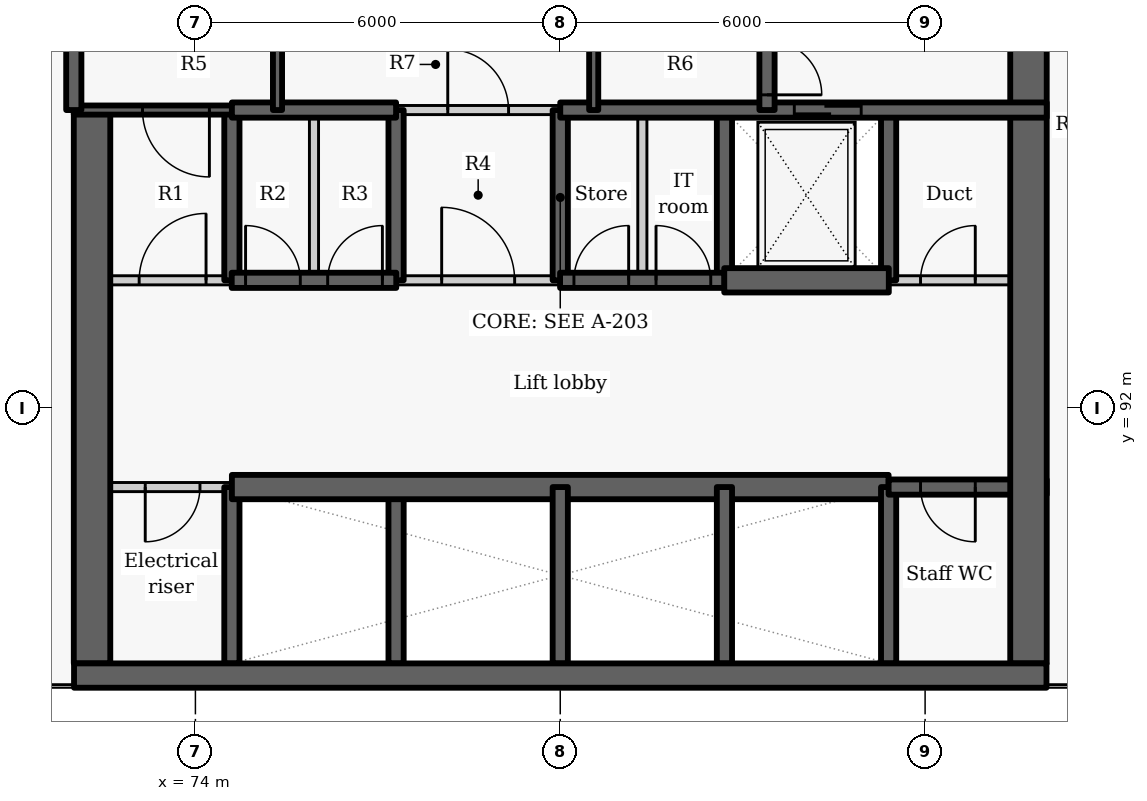
"""IFC4 building model, lengths in metres.
Left out: names, types, materials, properties, quantities, classifications, styles, units other than length and angle.
Written with IfcOpenShell. Run it as: python <this file> out.ifc"""

import sys

from ifc_helpers import new_model, si_unit, direction, frame, frame_2d, origin, place, context, subcontext, project, spatial, rectangle, extrude, element, fill, save


model = new_model("IFC4")
c1 = context("Model", 3, precision=1e-05, world=origin(), true_north=direction((0.0, 1.0)))
c2 = subcontext(c1, "Body", "Model", "MODEL_VIEW")
j1 = project(units=[si_unit("LENGTHUNIT", "METRE"), si_unit("PLANEANGLEUNIT", "RADIAN")], contexts=[c1])
p1 = place(None, origin())
s1 = spatial("IfcSite", under=j1, at=p1, CompositionType="ELEMENT")
p2 = place(p1, origin())
s2 = spatial("IfcBuilding", under=s1, at=p2, CompositionType="ELEMENT")
p3 = place(p2, frame((0.0, 0.0, 11.4)))
s3 = spatial("IfcBuildingStorey", under=s2, at=p3, CompositionType="ELEMENT", Elevation=11.4)
p4 = place(p3, frame((74.6, 87.8, -0.3), z_axis=(0.0, 0.0, 1.0), x_axis=(0.0, 1.0, 0.0)))
e1 = element("IfcWall", 1, at=p4, inside=s3, PredefinedType="SHEAR", context=c2, shape_type="SweptSolid", body=[
    extrude(rectangle(XDim=2.9, YDim=0.25, at=frame_2d((1.45, 0.0))), origin(), (0.0, 0.0, 1.0), 4.2),
])
p5 = place(p3, frame((74.6, 94.1, -0.3), z_axis=(0.0, 0.0, 1.0), x_axis=(0.0, 1.0, 0.0)))
e2 = element("IfcWall", 2, at=p5, inside=s3, PredefinedType="SHEAR", context=c2, shape_type="SweptSolid", body=[
    extrude(rectangle(XDim=2.8, YDim=0.25, at=frame_2d((1.4, 0.0))), origin(), (0.0, 0.0, 1.0), 4.2),
])
p6 = place(p3, frame((74.6, 90.7, 0.0), z_axis=(0.0, 0.0, 1.0), x_axis=(-1.0, 0.0, 0.0)))
e3 = element("IfcWall", 3, at=p6, inside=s3, PredefinedType="PARTITIONING", context=c2, shape_type="SweptSolid", body=[
    extrude(rectangle(XDim=2.6, YDim=0.15, at=frame_2d((1.3, 0.0))), origin(), (0.0, 0.0, 1.0), 3.9),
])
p7 = place(p6, frame((0.525, 0.0, 0.0)))
e4 = element("IfcOpeningElement", 4, at=p7, cuts=e3, PredefinedType="OPENING", context=c2, shape_type="SweptSolid", body=[
    extrude(rectangle(XDim=0.9, YDim=2.1, at=frame_2d((0.45, 1.05))), frame((0.0, 0.085, 0.0), z_axis=(0.0, -1.0, 0.0), x_axis=(1.0, 0.0, 0.0)), (0.0, 0.0, 1.0), 0.17),
])
p8 = place(p3, frame((72.3, 87.8, -0.3), z_axis=(0.0, 0.0, 1.0), x_axis=(0.0, 1.0, 0.0)))
e5 = element("IfcWall", 5, at=p8, inside=s3, PredefinedType="SHEAR", context=c2, shape_type="SweptSolid", body=[
    extrude(rectangle(XDim=9.1, YDim=0.6, at=frame_2d((4.55, 0.0))), origin(), (0.0, 0.0, 1.0), 4.2),
])
p9 = place(p3, frame((77.3, 87.8, -0.3), z_axis=(0.0, 0.0, 1.0), x_axis=(0.0, 1.0, 0.0)))
e6 = element("IfcWall", 6, at=p9, inside=s3, PredefinedType="SHEAR", context=c2, shape_type="SweptSolid", body=[
    extrude(rectangle(XDim=2.9, YDim=0.25, at=frame_2d((1.45, 0.0))), origin(), (0.0, 0.0, 1.0), 4.2),
])
p10 = place(p3, frame((77.3, 94.1, -0.3), z_axis=(0.0, 0.0, 1.0), x_axis=(0.0, 1.0, 0.0)))
e7 = element("IfcWall", 7, at=p10, inside=s3, PredefinedType="SHEAR", context=c2, shape_type="SweptSolid", body=[
    extrude(rectangle(XDim=2.8, YDim=0.25, at=frame_2d((1.4, 0.0))), origin(), (0.0, 0.0, 1.0), 4.2),
])
p11 = place(p3, frame((74.6, 90.7, -0.3), z_axis=(0.0, 0.0, 1.0), x_axis=(1.0, 0.0, 0.0)))
e8 = element("IfcWall", 8, at=p11, inside=s3, PredefinedType="SHEAR", context=c2, shape_type="SweptSolid", body=[
    extrude(rectangle(XDim=10.8, YDim=0.4, at=frame_2d((5.4, 0.0))), origin(), (0.0, 0.0, 1.0), 4.2),
])
p12 = place(p3, frame((80.0, 87.8, -0.3), z_axis=(0.0, 0.0, 1.0), x_axis=(0.0, 1.0, 0.0)))
e9 = element("IfcWall", 9, at=p12, inside=s3, PredefinedType="SHEAR", context=c2, shape_type="SweptSolid", body=[
    extrude(rectangle(XDim=2.9, YDim=0.25, at=frame_2d((1.45, 0.0))), origin(), (0.0, 0.0, 1.0), 4.2),
])
p13 = place(p3, frame((80.0, 94.1, -0.3), z_axis=(0.0, 0.0, 1.0), x_axis=(0.0, 1.0, 0.0)))
e10 = element("IfcWall", 10, at=p13, inside=s3, PredefinedType="SHEAR", context=c2, shape_type="SweptSolid", body=[
    extrude(rectangle(XDim=2.8, YDim=0.25, at=frame_2d((1.4, 0.0))), origin(), (0.0, 0.0, 1.0), 4.2),
])
p14 = place(p3, frame((82.7, 87.8, -0.3), z_axis=(0.0, 0.0, 1.0), x_axis=(0.0, 1.0, 0.0)))
e11 = element("IfcWall", 11, at=p14, inside=s3, PredefinedType="SHEAR", context=c2, shape_type="SweptSolid", body=[
    extrude(rectangle(XDim=2.9, YDim=0.25, at=frame_2d((1.45, 0.0))), origin(), (0.0, 0.0, 1.0), 4.2),
])
p15 = place(p3, frame((82.7, 94.1, -0.3), z_axis=(0.0, 0.0, 1.0), x_axis=(0.0, 1.0, 0.0)))
e12 = element("IfcWall", 12, at=p15, inside=s3, PredefinedType="SHEAR", context=c2, shape_type="SweptSolid", body=[
    extrude(rectangle(XDim=2.8, YDim=0.25, at=frame_2d((1.4, 0.0))), origin(), (0.0, 0.0, 1.0), 4.2),
])
p16 = place(p3, frame((85.4, 87.8, -0.3), z_axis=(0.0, 0.0, 1.0), x_axis=(0.0, 1.0, 0.0)))
e13 = element("IfcWall", 13, at=p16, inside=s3, PredefinedType="SHEAR", context=c2, shape_type="SweptSolid", body=[
    extrude(rectangle(XDim=2.9, YDim=0.25, at=frame_2d((1.45, 0.0))), origin(), (0.0, 0.0, 1.0), 4.2),
])
p17 = place(p3, frame((85.4, 94.1, -0.3), z_axis=(0.0, 0.0, 1.0), x_axis=(0.0, 1.0, 0.0)))
e14 = element("IfcWall", 14, at=p17, inside=s3, PredefinedType="SHEAR", context=c2, shape_type="SweptSolid", body=[
    extrude(rectangle(XDim=2.8, YDim=0.25, at=frame_2d((1.4, 0.0))), origin(), (0.0, 0.0, 1.0), 4.2),
])
p18 = place(p3, frame((88.0, 90.7, -0.3), z_axis=(0.0, 0.0, 1.0), x_axis=(-1.0, 0.0, 0.0)))
e15 = element("IfcWall", 15, at=p18, inside=s3, PredefinedType="SHEAR", context=c2, shape_type="SweptSolid", body=[
    extrude(rectangle(XDim=2.6, YDim=0.25, at=frame_2d((1.3, 0.0))), origin(), (0.0, 0.0, 1.0), 4.2),
])
p19 = place(p18, frame((1.175, 0.0, 0.3)))
e16 = element("IfcOpeningElement", 16, at=p19, cuts=e15, PredefinedType="OPENING", context=c2, shape_type="SweptSolid", body=[
    extrude(rectangle(XDim=0.9, YDim=2.1, at=frame_2d((0.45, 1.05))), frame((0.0, 0.135, 0.0), z_axis=(0.0, -1.0, 0.0), x_axis=(1.0, 0.0, 0.0)), (0.0, 0.0, 1.0), 0.27),
])
p20 = place(p3, frame((87.7, 103.4, -0.3), z_axis=(0.0, 0.0, 1.0), x_axis=(0.0, -1.0, 0.0)))
e17 = element("IfcWall", 17, at=p20, inside=s3, PredefinedType="SHEAR", context=c2, shape_type="SweptSolid", body=[
    extrude(rectangle(XDim=15.6, YDim=0.6, at=frame_2d((7.8, 0.0))), origin(), (0.0, 0.0, 1.0), 4.2),
])
p21 = place(p20, frame((2.7, 0.0, 0.3)))
e18 = element("IfcOpeningElement", 18, at=p21, cuts=e17, PredefinedType="OPENING", context=c2, shape_type="SweptSolid", body=[
    extrude(rectangle(XDim=1.1, YDim=2.1, at=frame_2d((0.55, 1.05))), frame((0.0, 0.31, 0.0), z_axis=(0.0, -1.0, 0.0), x_axis=(1.0, 0.0, 0.0)), (0.0, 0.0, 1.0), 0.62),
])
p22 = place(p3, frame((72.0, 94.1, 0.0), z_axis=(0.0, 0.0, 1.0), x_axis=(1.0, 0.0, 0.0)))
e19 = element("IfcWall", 19, at=p22, inside=s3, PredefinedType="PARTITIONING", context=c2, shape_type="SweptSolid", body=[
    extrude(rectangle(XDim=2.603, YDim=0.15, at=frame_2d((1.302, 0.0))), origin(), (0.0, 0.0, 1.0), 3.9),
])
p23 = place(p22, frame((1.075, 0.0, 0.0)))
e20 = element("IfcOpeningElement", 20, at=p23, cuts=e19, PredefinedType="OPENING", context=c2, shape_type="SweptSolid", body=[
    extrude(rectangle(XDim=1.1, YDim=2.1, at=frame_2d((0.55, 1.05))), frame((0.0, 0.085, 0.0), z_axis=(0.0, -1.0, 0.0), x_axis=(1.0, 0.0, 0.0)), (0.0, 0.0, 1.0), 0.17),
])
p24 = place(p3, frame((77.297, 94.1, 0.0), z_axis=(0.0, 0.0, 1.0), x_axis=(1.0, 0.0, 0.0)))
e21 = element("IfcWall", 21, at=p24, inside=s3, PredefinedType="PARTITIONING", context=c2, shape_type="SweptSolid", body=[
    extrude(rectangle(XDim=2.706, YDim=0.15, at=frame_2d((1.353, 0.0))), origin(), (0.0, 0.0, 1.0), 3.9),
])
p25 = place(p24, frame((0.753, 0.0, 0.0)))
e22 = element("IfcOpeningElement", 22, at=p25, cuts=e21, PredefinedType="OPENING", context=c2, shape_type="SweptSolid", body=[
    extrude(rectangle(XDim=1.2, YDim=2.1, at=frame_2d((0.6, 1.05))), frame((0.0, 0.085, 0.0), z_axis=(0.0, -1.0, 0.0), x_axis=(1.0, 0.0, 0.0)), (0.0, 0.0, 1.0), 0.17),
])
p26 = place(p3, frame((85.397, 94.1, 0.0), z_axis=(0.0, 0.0, 1.0), x_axis=(1.0, 0.0, 0.0)))
e23 = element("IfcWall", 23, at=p26, inside=s3, PredefinedType="PARTITIONING", context=c2, shape_type="SweptSolid", body=[
    extrude(rectangle(XDim=2.603, YDim=0.15, at=frame_2d((1.302, 0.0))), origin(), (0.0, 0.0, 1.0), 3.9),
])
p27 = place(p26, frame((0.528, 0.0, 0.0)))
e24 = element("IfcOpeningElement", 24, at=p27, cuts=e23, PredefinedType="OPENING", context=c2, shape_type="SweptSolid", body=[
    extrude(rectangle(XDim=0.9, YDim=2.1, at=frame_2d((0.45, 1.05))), frame((0.0, 0.085, 0.0), z_axis=(0.0, -1.0, 0.0), x_axis=(1.0, 0.0, 0.0)), (0.0, 0.0, 1.0), 0.17),
])
p28 = place(p3, frame((74.597, 94.1, -0.3), z_axis=(0.0, 0.0, 1.0), x_axis=(1.0, 0.0, 0.0)))
e25 = element("IfcWall", 25, at=p28, inside=s3, PredefinedType="SHEAR", context=c2, shape_type="SweptSolid", body=[
    extrude(rectangle(XDim=2.706, YDim=0.25, at=frame_2d((1.353, 0.0))), origin(), (0.0, 0.0, 1.0), 4.2),
])
p29 = place(p28, frame((0.228, 0.0, 0.3)))
e26 = element("IfcOpeningElement", 26, at=p29, cuts=e25, PredefinedType="OPENING", context=c2, shape_type="SweptSolid", body=[
    extrude(rectangle(XDim=0.9, YDim=2.1, at=frame_2d((0.45, 1.05))), frame((0.0, 0.135, 0.0), z_axis=(0.0, -1.0, 0.0), x_axis=(1.0, 0.0, 0.0)), (0.0, 0.0, 1.0), 0.27),
])
p30 = place(p28, frame((1.578, 0.0, 0.3)))
e27 = element("IfcOpeningElement", 27, at=p30, cuts=e25, PredefinedType="OPENING", context=c2, shape_type="SweptSolid", body=[
    extrude(rectangle(XDim=0.9, YDim=2.1, at=frame_2d((0.45, 1.05))), frame((0.0, 0.135, 0.0), z_axis=(0.0, -1.0, 0.0), x_axis=(1.0, 0.0, 0.0)), (0.0, 0.0, 1.0), 0.27),
])
p31 = place(p3, frame((79.997, 94.1, -0.3), z_axis=(0.0, 0.0, 1.0), x_axis=(1.0, 0.0, 0.0)))
e28 = element("IfcWall", 28, at=p31, inside=s3, PredefinedType="SHEAR", context=c2, shape_type="SweptSolid", body=[
    extrude(rectangle(XDim=2.706, YDim=0.25, at=frame_2d((1.353, 0.0))), origin(), (0.0, 0.0, 1.0), 4.2),
])
p32 = place(p31, frame((0.228, 0.0, 0.3)))
e29 = element("IfcOpeningElement", 29, at=p32, cuts=e28, PredefinedType="OPENING", context=c2, shape_type="SweptSolid", body=[
    extrude(rectangle(XDim=0.9, YDim=2.1, at=frame_2d((0.45, 1.05))), frame((0.0, 0.135, 0.0), z_axis=(0.0, -1.0, 0.0), x_axis=(1.0, 0.0, 0.0)), (0.0, 0.0, 1.0), 0.27),
])
p33 = place(p31, frame((1.578, 0.0, 0.3)))
e30 = element("IfcOpeningElement", 30, at=p33, cuts=e28, PredefinedType="OPENING", context=c2, shape_type="SweptSolid", body=[
    extrude(rectangle(XDim=0.9, YDim=2.1, at=frame_2d((0.45, 1.05))), frame((0.0, 0.135, 0.0), z_axis=(0.0, -1.0, 0.0), x_axis=(1.0, 0.0, 0.0)), (0.0, 0.0, 1.0), 0.27),
])
p34 = place(p3, frame((82.697, 94.1, -0.3), z_axis=(0.0, 0.0, 1.0), x_axis=(1.0, 0.0, 0.0)))
e31 = element("IfcWall", 31, at=p34, inside=s3, PredefinedType="SHEAR", context=c2, shape_type="SweptSolid", body=[
    extrude(rectangle(XDim=2.706, YDim=0.4, at=frame_2d((1.353, 0.0))), origin(), (0.0, 0.0, 1.0), 4.2),
])
p35 = place(p3, frame((74.6, 96.9, -0.3), z_axis=(0.0, 0.0, 1.0), x_axis=(-1.0, 0.0, 0.0)))
e32 = element("IfcWall", 32, at=p35, inside=s3, PredefinedType="SHEAR", context=c2, shape_type="SweptSolid", body=[
    extrude(rectangle(XDim=2.6, YDim=0.15, at=frame_2d((1.3, 0.0))), origin(), (0.0, 0.0, 1.0), 4.2),
])
p36 = place(p35, frame((0.37, 0.0, 0.3)))
e33 = element("IfcOpeningElement", 33, at=p36, cuts=e32, PredefinedType="OPENING", context=c2, shape_type="SweptSolid", body=[
    extrude(rectangle(XDim=1.1, YDim=2.1, at=frame_2d((0.55, 1.05))), frame((0.0, 0.085, 0.0), z_axis=(0.0, -1.0, 0.0), x_axis=(1.0, 0.0, 0.0)), (0.0, 0.0, 1.0), 0.17),
])
p37 = place(p3, frame((75.95, 94.1, 0.0), z_axis=(0.0, 0.0, 1.0), x_axis=(0.0, 1.0, 0.0)))
e34 = element("IfcWall", 34, at=p37, inside=s3, PredefinedType="PARTITIONING", context=c2, shape_type="SweptSolid", body=[
    extrude(rectangle(XDim=2.8, YDim=0.15, at=frame_2d((1.4, 0.0))), origin(), (0.0, 0.0, 1.0), 3.9),
])
p38 = place(p3, frame((74.6, 96.9, -0.3), z_axis=(0.0, 0.0, 1.0), x_axis=(1.0, 0.0, 0.0)))
e35 = element("IfcWall", 35, at=p38, inside=s3, PredefinedType="SHEAR", context=c2, shape_type="SweptSolid", body=[
    extrude(rectangle(XDim=2.7, YDim=0.25, at=frame_2d((1.35, 0.0))), origin(), (0.0, 0.0, 1.0), 4.2),
])
p39 = place(p3, frame((80.0, 96.9, -0.3), z_axis=(0.0, 0.0, 1.0), x_axis=(1.0, 0.0, 0.0)))
e36 = element("IfcWall", 36, at=p39, inside=s3, PredefinedType="SHEAR", context=c2, shape_type="SweptSolid", body=[
    extrude(rectangle(XDim=8.0, YDim=0.25, at=frame_2d((4.0, 0.0))), origin(), (0.0, 0.0, 1.0), 4.2),
])
p40 = place(p39, frame((3.849, 0.0, 0.3)))
e37 = element("IfcOpeningElement", 37, at=p40, cuts=e36, PredefinedType="OPENING", context=c2, shape_type="SweptSolid", body=[
    extrude(rectangle(XDim=1.1, YDim=2.1, at=frame_2d((0.55, 1.05))), frame((0.0, 0.135, 0.0), z_axis=(0.0, -1.0, 0.0), x_axis=(1.0, 0.0, 0.0)), (0.0, 0.0, 1.0), 0.27),
])
p41 = place(p3, frame((77.3, 96.9, 0.0), z_axis=(0.0, 0.0, 1.0), x_axis=(1.0, 0.0, 0.0)))
e38 = element("IfcWall", 38, at=p41, inside=s3, PredefinedType="PARTITIONING", context=c2, shape_type="SweptSolid", body=[
    extrude(rectangle(XDim=2.7, YDim=0.15, at=frame_2d((1.35, 0.0))), origin(), (0.0, 0.0, 1.0), 3.9),
])
p42 = place(p41, frame((0.85, 0.0, 0.0)))
e39 = element("IfcOpeningElement", 39, at=p42, cuts=e38, PredefinedType="OPENING", context=c2, shape_type="SweptSolid", body=[
    extrude(rectangle(XDim=1.0, YDim=2.1, at=frame_2d((0.5, 1.05))), frame((0.0, 0.085, 0.0), z_axis=(0.0, -1.0, 0.0), x_axis=(1.0, 0.0, 0.0)), (0.0, 0.0, 1.0), 0.17),
])
p43 = place(p3, frame((81.35, 94.1, 0.0), z_axis=(0.0, 0.0, 1.0), x_axis=(0.0, 1.0, 0.0)))
e40 = element("IfcWall", 40, at=p43, inside=s3, PredefinedType="PARTITIONING", context=c2, shape_type="SweptSolid", body=[
    extrude(rectangle(XDim=2.8, YDim=0.15, at=frame_2d((1.4, 0.0))), origin(), (0.0, 0.0, 1.0), 3.9),
])
p44 = place(p3, frame((75.35, 96.9, -0.3), z_axis=(0.0, 0.0, 1.0), x_axis=(0.0, 1.0, 0.0)))
e41 = element("IfcWall", 41, at=p44, inside=s3, PredefinedType="SHEAR", context=c2, shape_type="SweptSolid", body=[
    extrude(rectangle(XDim=1.503, YDim=0.15, at=frame_2d((0.751, 0.0))), origin(), (0.0, 0.0, 1.0), 4.2),
])
p45 = place(p3, frame((72.0, 96.9, -0.3), z_axis=(0.0, 0.0, 1.0), x_axis=(0.0, 1.0, 0.0)))
e42 = element("IfcWall", 42, at=p45, inside=s3, PredefinedType="SHEAR", context=c2, shape_type="SweptSolid", body=[
    extrude(rectangle(XDim=6.5, YDim=0.25, at=frame_2d((3.25, 0.0))), origin(), (0.0, 0.0, 1.0), 4.2),
])
p46 = place(p3, frame((83.4, 103.4, -0.3), z_axis=(0.0, 0.0, 1.0), x_axis=(0.0, -1.0, 0.0)))
e43 = element("IfcWall", 43, at=p46, inside=s3, PredefinedType="SHEAR", context=c2, shape_type="SweptSolid", body=[
    extrude(rectangle(XDim=6.5, YDim=0.25, at=frame_2d((3.25, 0.0))), origin(), (0.0, 0.0, 1.0), 4.2),
])
p47 = place(p46, frame((5.35, 0.0, 0.3)))
e44 = element("IfcOpeningElement", 44, at=p47, cuts=e43, PredefinedType="OPENING", context=c2, shape_type="SweptSolid", body=[
    extrude(rectangle(XDim=0.9, YDim=2.1, at=frame_2d((0.45, 1.05))), frame((0.0, 0.135, 0.0), z_axis=(0.0, -1.0, 0.0), x_axis=(1.0, 0.0, 0.0)), (0.0, 0.0, 1.0), 0.27),
])
p48 = place(p3, frame((80.55, 96.9, -0.3), z_axis=(0.0, 0.0, 1.0), x_axis=(0.0, 1.0, 0.0)))
e45 = element("IfcWall", 45, at=p48, inside=s3, PredefinedType="SHEAR", context=c2, shape_type="SweptSolid", body=[
    extrude(rectangle(XDim=1.503, YDim=0.15, at=frame_2d((0.751, 0.0))), origin(), (0.0, 0.0, 1.0), 4.2),
])
p49 = place(p3, frame((72.004, 87.6, -0.3), z_axis=(0.0, 0.0, 1.0), x_axis=(1.0, 0.0, 0.0)))
e46 = element("IfcWall", 46, at=p49, inside=s3, PredefinedType="SHEAR", context=c2, shape_type="SweptSolid", body=[
    extrude(rectangle(XDim=15.992, YDim=0.4, at=frame_2d((7.996, 0.0))), origin(), (0.0, 0.0, 1.0), 4.2),
])
p50 = place(p7, origin())
e47 = element("IfcDoor", 47, at=p50, inside=s3, OperationType="SINGLE_SWING_RIGHT", PredefinedType="DOOR", context=c2, shape_type="SweptSolid", body=[
    extrude(rectangle(XDim=0.9, YDim=2.1, at=frame_2d((0.45, 1.05))), frame((0.0, 0.025, 0.0), z_axis=(0.0, -1.0, 0.0), x_axis=(1.0, 0.0, 0.0)), (0.0, 0.0, 1.0), 0.05),
])
fill(e4, e47)
p51 = place(p19, origin())
e48 = element("IfcDoor", 48, at=p51, inside=s3, OperationType="SINGLE_SWING_LEFT", PredefinedType="DOOR", context=c2, shape_type="SweptSolid", body=[
    extrude(rectangle(XDim=0.9, YDim=2.1, at=frame_2d((0.45, 1.05))), frame((0.0, 0.025, 0.0), z_axis=(0.0, -1.0, 0.0), x_axis=(1.0, 0.0, 0.0)), (0.0, 0.0, 1.0), 0.05),
])
fill(e16, e48)
p52 = place(p23, origin())
e49 = element("IfcDoor", 49, at=p52, inside=s3, OperationType="SINGLE_SWING_RIGHT", PredefinedType="DOOR", context=c2, shape_type="SweptSolid", body=[
    extrude(rectangle(XDim=1.1, YDim=2.1, at=frame_2d((0.55, 1.05))), frame((0.0, 0.025, 0.0), z_axis=(0.0, -1.0, 0.0), x_axis=(1.0, 0.0, 0.0)), (0.0, 0.0, 1.0), 0.05),
])
fill(e20, e49)
p53 = place(p29, origin())
e50 = element("IfcDoor", 50, at=p53, inside=s3, OperationType="SINGLE_SWING_LEFT", PredefinedType="DOOR", context=c2, shape_type="SweptSolid", body=[
    extrude(rectangle(XDim=0.9, YDim=2.1, at=frame_2d((0.45, 1.05))), frame((0.0, 0.025, 0.0), z_axis=(0.0, -1.0, 0.0), x_axis=(1.0, 0.0, 0.0)), (0.0, 0.0, 1.0), 0.05),
])
fill(e26, e50)
p54 = place(p30, origin())
e51 = element("IfcDoor", 51, at=p54, inside=s3, OperationType="SINGLE_SWING_RIGHT", PredefinedType="DOOR", context=c2, shape_type="SweptSolid", body=[
    extrude(rectangle(XDim=0.9, YDim=2.1, at=frame_2d((0.45, 1.05))), frame((0.0, 0.025, 0.0), z_axis=(0.0, -1.0, 0.0), x_axis=(1.0, 0.0, 0.0)), (0.0, 0.0, 1.0), 0.05),
])
fill(e27, e51)
p55 = place(p25, origin())
e52 = element("IfcDoor", 52, at=p55, inside=s3, OperationType="DOUBLE_DOOR_SINGLE_SWING", PredefinedType="DOOR", context=c2, shape_type="SweptSolid", body=[
    extrude(rectangle(XDim=1.2, YDim=2.1, at=frame_2d((0.6, 1.05))), frame((0.0, 0.025, 0.0), z_axis=(0.0, -1.0, 0.0), x_axis=(1.0, 0.0, 0.0)), (0.0, 0.0, 1.0), 0.05),
])
fill(e22, e52)
p56 = place(p32, origin())
e53 = element("IfcDoor", 53, at=p56, inside=s3, OperationType="SINGLE_SWING_RIGHT", PredefinedType="DOOR", context=c2, shape_type="SweptSolid", body=[
    extrude(rectangle(XDim=0.9, YDim=2.1, at=frame_2d((0.45, 1.05))), frame((0.0, 0.025, 0.0), z_axis=(0.0, -1.0, 0.0), x_axis=(1.0, 0.0, 0.0)), (0.0, 0.0, 1.0), 0.05),
])
fill(e29, e53)
p57 = place(p33, origin())
e54 = element("IfcDoor", 54, at=p57, inside=s3, OperationType="SINGLE_SWING_LEFT", PredefinedType="DOOR", context=c2, shape_type="SweptSolid", body=[
    extrude(rectangle(XDim=0.9, YDim=2.1, at=frame_2d((0.45, 1.05))), frame((0.0, 0.025, 0.0), z_axis=(0.0, -1.0, 0.0), x_axis=(1.0, 0.0, 0.0)), (0.0, 0.0, 1.0), 0.05),
])
fill(e30, e54)
p58 = place(p40, origin())
e55 = element("IfcDoor", 55, at=p58, inside=s3, OperationType="SLIDING_TO_LEFT", PredefinedType="DOOR", context=c2, shape_type="SweptSolid", body=[
    extrude(rectangle(XDim=1.1, YDim=2.1, at=frame_2d((0.55, 1.05))), frame((0.0, 0.025, 0.0), z_axis=(0.0, -1.0, 0.0), x_axis=(1.0, 0.0, 0.0)), (0.0, 0.0, 1.0), 0.05),
])
fill(e37, e55)
p59 = place(p27, origin())
e56 = element("IfcDoor", 56, at=p59, inside=s3, OperationType="SINGLE_SWING_RIGHT", PredefinedType="DOOR", context=c2, shape_type="SweptSolid", body=[
    extrude(rectangle(XDim=0.9, YDim=2.1, at=frame_2d((0.45, 1.05))), frame((0.0, 0.025, 0.0), z_axis=(0.0, -1.0, 0.0), x_axis=(1.0, 0.0, 0.0)), (0.0, 0.0, 1.0), 0.05),
])
fill(e24, e56)
p60 = place(p42, origin())
e57 = element("IfcDoor", 57, at=p60, inside=s3, OperationType="SINGLE_SWING_LEFT", PredefinedType="DOOR", context=c2, shape_type="SweptSolid", body=[
    extrude(rectangle(XDim=1.0, YDim=2.1, at=frame_2d((0.5, 1.05))), frame((0.0, 0.025, 0.0), z_axis=(0.0, -1.0, 0.0), x_axis=(1.0, 0.0, 0.0)), (0.0, 0.0, 1.0), 0.05),
])
fill(e39, e57)
p61 = place(p36, origin())
e58 = element("IfcDoor", 58, at=p61, inside=s3, OperationType="SINGLE_SWING_LEFT", PredefinedType="DOOR", context=c2, shape_type="SweptSolid", body=[
    extrude(rectangle(XDim=1.1, YDim=2.1, at=frame_2d((0.55, 1.05))), frame((0.0, 0.025, 0.0), z_axis=(0.0, -1.0, 0.0), x_axis=(1.0, 0.0, 0.0)), (0.0, 0.0, 1.0), 0.05),
])
fill(e33, e58)
p62 = place(p47, origin())
e59 = element("IfcDoor", 59, at=p62, inside=s3, OperationType="SINGLE_SWING_RIGHT", PredefinedType="DOOR", context=c2, shape_type="SweptSolid", body=[
    extrude(rectangle(XDim=0.9, YDim=2.1, at=frame_2d((0.45, 1.05))), frame((0.0, 0.025, 0.0), z_axis=(0.0, -1.0, 0.0), x_axis=(1.0, 0.0, 0.0)), (0.0, 0.0, 1.0), 0.05),
])
fill(e44, e59)
save(model, sys.argv[1])
